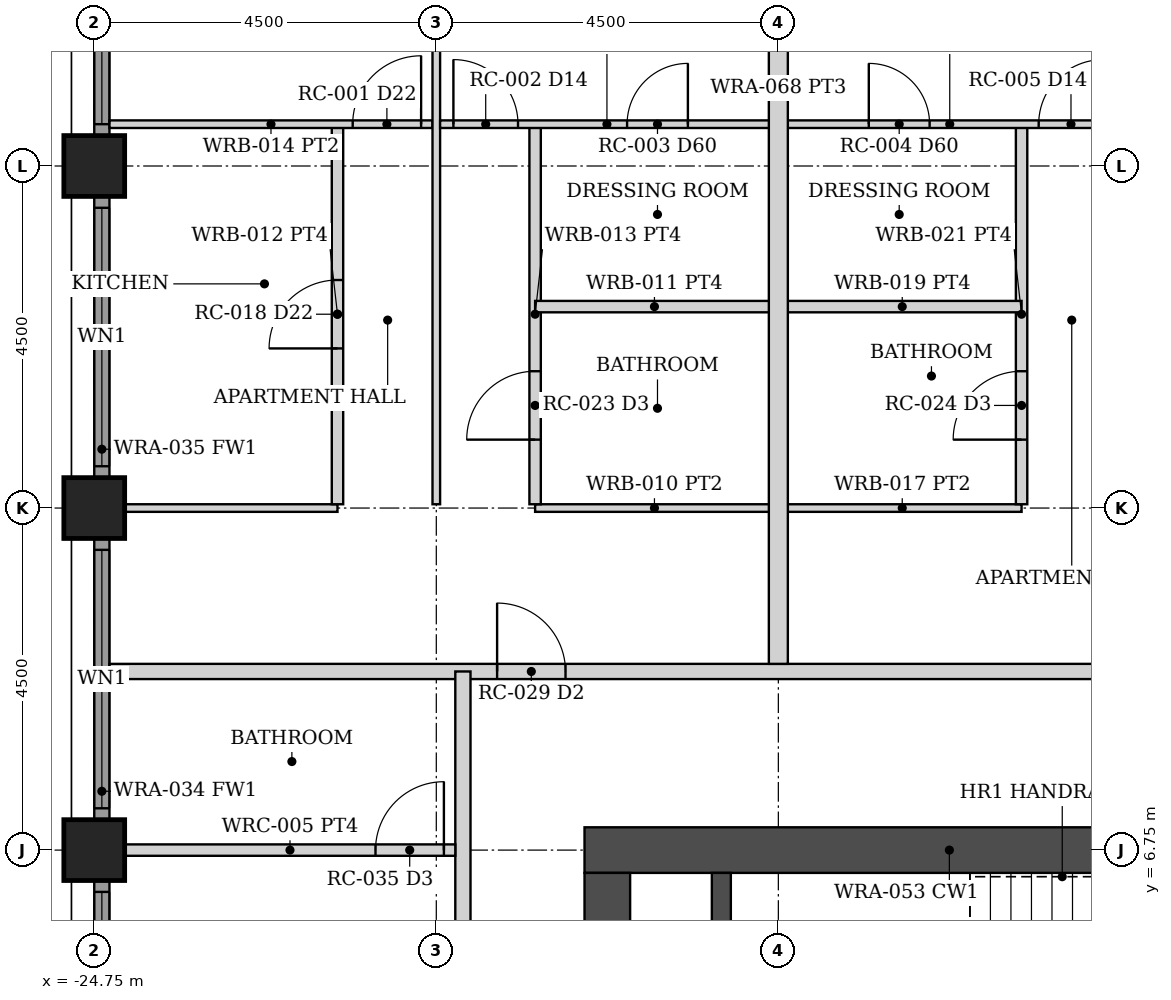
"""IFC4 building model, lengths in metres.
Left out: names, types, materials, properties, quantities, classifications, styles, units other than length and angle.
Written with IfcOpenShell. Run it as: python <this file> out.ifc"""

import sys

from ifc_helpers import new_model, si_unit, direction, frame, frame_2d, origin, origin_2d, place, context, subcontext, project, spatial, rectangle, hollow_rectangle, extrude, element, fill, save


model = new_model("IFC4")
c1 = context("Model", 3, precision=1e-05, world=origin(), true_north=direction((0.0, 1.0)))
c2 = subcontext(c1, "Body", "Model", "MODEL_VIEW")
j1 = project(units=[si_unit("LENGTHUNIT", "METRE"), si_unit("PLANEANGLEUNIT", "RADIAN")], contexts=[c1])
p1 = place(None, origin())
s1 = spatial("IfcSite", under=j1, at=p1, CompositionType="ELEMENT")
p2 = place(p1, origin())
s2 = spatial("IfcBuilding", under=s1, at=p2, CompositionType="ELEMENT")
p3 = place(p2, frame((0.0, 0.0, 47.5)))
s3 = spatial("IfcBuildingStorey", under=s2, at=p3, CompositionType="ELEMENT", Elevation=47.5)
for number, where, z_axis, x_axis in (
    (1, (-24.75, 6.75, 0.0), (0.0, 0.0, 1.0), (1.0, 0.0, 0.0)),
    (2, (-24.75, 11.25, 0.0), (0.0, 0.0, 1.0), (1.0, 0.0, 0.0)),
    (3, (-24.75, 15.75, 0.0), (0.0, 0.0, 1.0), (1.0, 0.0, 0.0)),
):
    element("IfcColumn", number, at=place(p3, frame(where, z_axis=z_axis, x_axis=x_axis)), inside=s3, PredefinedType="COLUMN", context=c2, shape_type="SweptSolid", body=[
        extrude(hollow_rectangle(XDim=0.8, YDim=0.8, WallThickness=0.07, at=origin_2d()), origin(), (0.0, 0.0, 1.0), 3.5),
    ])
p4 = place(p3, frame((-8.7, 6.75, 0.0), z_axis=(0.0, 0.0, 1.0), x_axis=(-1.0, 0.0, 0.0)))
e4 = element("IfcWall", 4, at=p4, inside=s3, PredefinedType="SHEAR", context=c2, shape_type="SweptSolid", body=[
    extrude(rectangle(XDim=9.6, YDim=0.6, at=frame_2d((4.8, 0.0))), origin(), (0.0, 0.0, 1.0), 3.5),
])
p5 = place(p3, frame((-18.0, -6.45, 0.0), z_axis=(0.0, 0.0, 1.0), x_axis=(0.0, 1.0, 0.0)))
e5 = element("IfcWall", 5, at=p5, inside=s3, PredefinedType="SHEAR", context=c2, shape_type="SweptSolid", body=[
    extrude(rectangle(XDim=12.9, YDim=0.6, at=frame_2d((6.45, 0.0))), origin(), (0.0, 0.0, 1.0), 3.5),
])
p6 = place(p3, frame((-16.5, 3.325, 0.0), z_axis=(0.0, 0.0, 1.0), x_axis=(0.0, 1.0, 0.0)))
e6 = element("IfcWall", 6, at=p6, inside=s3, PredefinedType="SHEAR", context=c2, shape_type="SweptSolid", body=[
    extrude(rectangle(XDim=3.125, YDim=0.25, at=frame_2d((1.562, 0.0))), origin(), (0.0, 0.0, 1.0), 3.5),
])
p7 = place(p3, frame((-24.65, 2.655, 0.0), z_axis=(0.0, 0.0, 1.0), x_axis=(0.0, 1.0, 0.0)))
e7 = element("IfcWall", 7, at=p7, inside=s3, PredefinedType="SOLIDWALL", context=c2, shape_type="SweptSolid", body=[
    extrude(rectangle(XDim=3.69, YDim=0.2, at=frame_2d((1.845, 0.0))), origin(), (0.0, 0.0, 1.0), 2.379),
])
p8 = place(p7, frame((0.145, 0.0, 0.3)))
e8 = element("IfcOpeningElement", 8, at=p8, cuts=e7, PredefinedType="OPENING", context=c2, shape_type="SweptSolid", body=[
    extrude(rectangle(XDim=3.4, YDim=1.929, at=frame_2d((1.7, 0.964))), frame((0.0, 0.11, 0.0), z_axis=(0.0, -1.0, 0.0), x_axis=(1.0, 0.0, 0.0)), (0.0, 0.0, 1.0), 0.22),
])
p9 = place(p3, frame((-24.65, 7.155, 0.0), z_axis=(0.0, 0.0, 1.0), x_axis=(0.0, 1.0, 0.0)))
e9 = element("IfcWall", 9, at=p9, inside=s3, PredefinedType="SOLIDWALL", context=c2, shape_type="SweptSolid", body=[
    extrude(rectangle(XDim=3.69, YDim=0.2, at=frame_2d((1.845, 0.0))), origin(), (0.0, 0.0, 1.0), 2.379),
])
p10 = place(p9, frame((0.145, 0.0, 0.3)))
e10 = element("IfcOpeningElement", 10, at=p10, cuts=e9, PredefinedType="OPENING", context=c2, shape_type="SweptSolid", body=[
    extrude(rectangle(XDim=3.4, YDim=1.929, at=frame_2d((1.7, 0.964))), frame((0.0, 0.11, 0.0), z_axis=(0.0, -1.0, 0.0), x_axis=(1.0, 0.0, 0.0)), (0.0, 0.0, 1.0), 0.22),
])
p11 = place(p3, frame((-24.65, 11.655, 0.0), z_axis=(0.0, 0.0, 1.0), x_axis=(0.0, 1.0, 0.0)))
e11 = element("IfcWall", 11, at=p11, inside=s3, PredefinedType="SOLIDWALL", context=c2, shape_type="SweptSolid", body=[
    extrude(rectangle(XDim=3.69, YDim=0.2, at=frame_2d((1.845, 0.0))), origin(), (0.0, 0.0, 1.0), 2.379),
])
p12 = place(p11, frame((0.145, 0.0, 0.3)))
e12 = element("IfcOpeningElement", 12, at=p12, cuts=e11, PredefinedType="OPENING", context=c2, shape_type="SweptSolid", body=[
    extrude(rectangle(XDim=3.4, YDim=1.929, at=frame_2d((1.7, 0.964))), frame((0.0, 0.11, 0.0), z_axis=(0.0, -1.0, 0.0), x_axis=(1.0, 0.0, 0.0)), (0.0, 0.0, 1.0), 0.22),
])
p13 = place(p3, frame((-24.65, 16.155, 0.0), z_axis=(0.0, 0.0, 1.0), x_axis=(0.0, 1.0, 0.0)))
e13 = element("IfcWall", 13, at=p13, inside=s3, PredefinedType="SOLIDWALL", context=c2, shape_type="SweptSolid", body=[
    extrude(rectangle(XDim=3.69, YDim=0.2, at=frame_2d((1.845, 0.0))), origin(), (0.0, 0.0, 1.0), 2.379),
])
p14 = place(p13, frame((0.145, 0.0, 0.3)))
e14 = element("IfcOpeningElement", 14, at=p14, cuts=e13, PredefinedType="OPENING", context=c2, shape_type="SweptSolid", body=[
    extrude(rectangle(XDim=3.4, YDim=1.929, at=frame_2d((1.7, 0.964))), frame((0.0, 0.11, 0.0), z_axis=(0.0, -1.0, 0.0), x_axis=(1.0, 0.0, 0.0)), (0.0, 0.0, 1.0), 0.22),
])
p15 = place(p3, frame((-24.55, 9.1, 0.0), z_axis=(0.0, 0.0, 1.0), x_axis=(1.0, 0.0, 0.0)))
e15 = element("IfcWall", 15, at=p15, inside=s3, PredefinedType="PARTITIONING", context=c2, shape_type="SweptSolid", body=[
    extrude(rectangle(XDim=49.1, YDim=0.2, at=frame_2d((24.55, 0.0))), origin(), (0.0, 0.0, 1.0), 2.373),
])
p16 = place(p15, frame((5.1, 0.0, 0.0)))
e16 = element("IfcOpeningElement", 16, at=p16, cuts=e15, PredefinedType="OPENING", context=c2, shape_type="SweptSolid", body=[
    extrude(rectangle(XDim=0.9, YDim=2.1, at=frame_2d((0.45, 1.05))), frame((0.0, 0.11, 0.0), z_axis=(0.0, -1.0, 0.0), x_axis=(1.0, 0.0, 0.0)), (0.0, 0.0, 1.0), 0.22),
])
p17 = place(p15, frame((13.6, 0.0, 0.0)))
e17 = element("IfcOpeningElement", 17, at=p17, cuts=e15, PredefinedType="OPENING", context=c2, shape_type="SweptSolid", body=[
    extrude(rectangle(XDim=0.9, YDim=2.1, at=frame_2d((0.45, 1.05))), frame((0.0, 0.11, 0.0), z_axis=(0.0, -1.0, 0.0), x_axis=(1.0, 0.0, 0.0)), (0.0, 0.0, 1.0), 0.22),
])
p18 = place(p15, frame((18.1, 0.0, 0.0)))
e18 = element("IfcOpeningElement", 18, at=p18, cuts=e15, PredefinedType="OPENING", context=c2, shape_type="SweptSolid", body=[
    extrude(rectangle(XDim=0.9, YDim=2.1, at=frame_2d((0.45, 1.05))), frame((0.0, 0.11, 0.0), z_axis=(0.0, -1.0, 0.0), x_axis=(1.0, 0.0, 0.0)), (0.0, 0.0, 1.0), 0.22),
])
p19 = place(p15, frame((31.6, 0.0, 0.0)))
e19 = element("IfcOpeningElement", 19, at=p19, cuts=e15, PredefinedType="OPENING", context=c2, shape_type="SweptSolid", body=[
    extrude(rectangle(XDim=0.9, YDim=2.1, at=frame_2d((0.45, 1.05))), frame((0.0, 0.11, 0.0), z_axis=(0.0, -1.0, 0.0), x_axis=(1.0, 0.0, 0.0)), (0.0, 0.0, 1.0), 0.22),
])
p20 = place(p15, frame((43.1, 0.0, 0.0)))
e20 = element("IfcOpeningElement", 20, at=p20, cuts=e15, PredefinedType="OPENING", context=c2, shape_type="SweptSolid", body=[
    extrude(rectangle(XDim=0.9, YDim=2.1, at=frame_2d((0.45, 1.05))), frame((0.0, 0.11, 0.0), z_axis=(0.0, -1.0, 0.0), x_axis=(1.0, 0.0, 0.0)), (0.0, 0.0, 1.0), 0.22),
])
p21 = place(p3, frame((-19.9, -9.1, 0.0), z_axis=(0.0, 0.0, 1.0), x_axis=(0.0, 1.0, 0.0)))
e21 = element("IfcWall", 21, at=p21, inside=s3, PredefinedType="PARTITIONING", context=c2, shape_type="SweptSolid", body=[
    extrude(rectangle(XDim=18.2, YDim=0.2, at=frame_2d((9.1, 0.0))), origin(), (0.0, 0.0, 1.0), 2.373),
])
p22 = place(p21, frame((6.4, 0.0, 0.0)))
e22 = element("IfcOpeningElement", 22, at=p22, cuts=e21, PredefinedType="OPENING", context=c2, shape_type="SweptSolid", body=[
    extrude(rectangle(XDim=0.9, YDim=2.1, at=frame_2d((0.45, 1.05))), frame((0.0, 0.11, 0.0), z_axis=(0.0, -1.0, 0.0), x_axis=(1.0, 0.0, 0.0)), (0.0, 0.0, 1.0), 0.22),
])
p23 = place(p3, frame((-24.35, 11.25, 0.0), z_axis=(0.0, 0.0, 1.0), x_axis=(1.0, 0.0, 0.0)))
e23 = element("IfcWall", 23, at=p23, inside=s3, PredefinedType="PARTITIONING", context=c2, shape_type="SweptSolid", body=[
    extrude(rectangle(XDim=2.8, YDim=0.1, at=frame_2d((1.4, 0.0))), origin(), (0.0, 0.0, 1.0), 2.373),
])
p24 = place(p3, frame((-21.55, 11.3, 0.0), z_axis=(0.0, 0.0, 1.0), x_axis=(0.0, 1.0, 0.0)))
e24 = element("IfcWall", 24, at=p24, inside=s3, PredefinedType="PARTITIONING", context=c2, shape_type="SweptSolid", body=[
    extrude(rectangle(XDim=5.0, YDim=0.15, at=frame_2d((2.5, 0.0))), origin(), (0.0, 0.0, 1.0), 2.373),
])
p25 = place(p24, frame((2.05, 0.0, 0.0)))
e25 = element("IfcOpeningElement", 25, at=p25, cuts=e24, PredefinedType="OPENING", context=c2, shape_type="SweptSolid", body=[
    extrude(rectangle(XDim=0.9, YDim=2.1, at=frame_2d((0.45, 1.05))), frame((0.0, 0.085, 0.0), z_axis=(0.0, -1.0, 0.0), x_axis=(1.0, 0.0, 0.0)), (0.0, 0.0, 1.0), 0.17),
])
p26 = place(p3, frame((-24.55, 16.3, 0.0), z_axis=(0.0, 0.0, 1.0), x_axis=(1.0, 0.0, 0.0)))
e26 = element("IfcWall", 26, at=p26, inside=s3, PredefinedType="PARTITIONING", context=c2, shape_type="SweptSolid", body=[
    extrude(rectangle(XDim=4.25, YDim=0.1, at=frame_2d((2.125, 0.0))), origin(), (0.0, 0.0, 1.0), 2.373),
])
p27 = place(p26, frame((3.2, 0.0, 0.0)))
e27 = element("IfcOpeningElement", 27, at=p27, cuts=e26, PredefinedType="OPENING", context=c2, shape_type="SweptSolid", body=[
    extrude(rectangle(XDim=0.9, YDim=2.1, at=frame_2d((0.45, 1.05))), frame((0.0, 0.06, 0.0), z_axis=(0.0, -1.0, 0.0), x_axis=(1.0, 0.0, 0.0)), (0.0, 0.0, 1.0), 0.12),
])
p28 = place(p3, frame((-20.25, 11.3, 0.0), z_axis=(0.0, 0.0, 1.0), x_axis=(0.0, 1.0, 0.0)))
e28 = element("IfcWall", 28, at=p28, inside=s3, PredefinedType="PARTITIONING", context=c2, shape_type="SweptSolid", body=[
    extrude(rectangle(XDim=13.05, YDim=0.1, at=frame_2d((6.525, 0.0))), origin(), (0.0, 0.0, 1.0), 2.373),
])
p29 = place(p3, frame((-18.95, 11.25, 0.0), z_axis=(0.0, 0.0, 1.0), x_axis=(1.0, 0.0, 0.0)))
e29 = element("IfcWall", 29, at=p29, inside=s3, PredefinedType="PARTITIONING", context=c2, shape_type="SweptSolid", body=[
    extrude(rectangle(XDim=3.14, YDim=0.1, at=frame_2d((1.57, 0.0))), origin(), (0.0, 0.0, 1.0), 2.373),
])
p30 = place(p3, frame((-18.95, 11.3, 0.0), z_axis=(0.0, 0.0, 1.0), x_axis=(0.0, 1.0, 0.0)))
e30 = element("IfcWall", 30, at=p30, inside=s3, PredefinedType="PARTITIONING", context=c2, shape_type="SweptSolid", body=[
    extrude(rectangle(XDim=5.0, YDim=0.15, at=frame_2d((2.5, 0.0))), origin(), (0.0, 0.0, 1.0), 2.373),
])
p31 = place(p30, frame((0.85, 0.0, 0.0)))
e31 = element("IfcOpeningElement", 31, at=p31, cuts=e30, PredefinedType="OPENING", context=c2, shape_type="SweptSolid", body=[
    extrude(rectangle(XDim=0.9, YDim=2.1, at=frame_2d((0.45, 1.05))), frame((0.0, 0.085, 0.0), z_axis=(0.0, -1.0, 0.0), x_axis=(1.0, 0.0, 0.0)), (0.0, 0.0, 1.0), 0.17),
])
p32 = place(p3, frame((-20.2, 16.3, 0.0), z_axis=(0.0, 0.0, 1.0), x_axis=(1.0, 0.0, 0.0)))
e32 = element("IfcWall", 32, at=p32, inside=s3, PredefinedType="PARTITIONING", context=c2, shape_type="SweptSolid", body=[
    extrude(rectangle(XDim=4.39, YDim=0.1, at=frame_2d((2.195, 0.0))), origin(), (0.0, 0.0, 1.0), 2.373),
])
p33 = place(p32, frame((0.175, 0.0, 0.0)))
e33 = element("IfcOpeningElement", 33, at=p33, cuts=e32, PredefinedType="OPENING", context=c2, shape_type="SweptSolid", body=[
    extrude(rectangle(XDim=0.85, YDim=2.1, at=frame_2d((0.425, 1.05))), frame((0.0, 0.06, 0.0), z_axis=(0.0, -1.0, 0.0), x_axis=(1.0, 0.0, 0.0)), (0.0, 0.0, 1.0), 0.12),
])
p34 = place(p32, frame((2.46, 0.0, 0.0)))
e34 = element("IfcOpeningElement", 34, at=p34, cuts=e32, PredefinedType="OPENING", context=c2, shape_type="SweptSolid", body=[
    extrude(rectangle(XDim=0.8, YDim=2.1, at=frame_2d((0.4, 1.05))), frame((0.0, 0.06, 0.0), z_axis=(0.0, -1.0, 0.0), x_axis=(1.0, 0.0, 0.0)), (0.0, 0.0, 1.0), 0.12),
])
p35 = place(p3, frame((-18.95, 13.9, 0.0), z_axis=(0.0, 0.0, 1.0), x_axis=(1.0, 0.0, 0.0)))
e35 = element("IfcWall", 35, at=p35, inside=s3, PredefinedType="PARTITIONING", context=c2, shape_type="SweptSolid", body=[
    extrude(rectangle(XDim=3.14, YDim=0.15, at=frame_2d((1.57, 0.0))), origin(), (0.0, 0.0, 1.0), 2.373),
])
p36 = place(p3, frame((-15.69, 11.25, 0.0), z_axis=(0.0, 0.0, 1.0), x_axis=(1.0, 0.0, 0.0)))
e36 = element("IfcWall", 36, at=p36, inside=s3, PredefinedType="PARTITIONING", context=c2, shape_type="SweptSolid", body=[
    extrude(rectangle(XDim=3.14, YDim=0.1, at=frame_2d((1.57, 0.0))), origin(), (0.0, 0.0, 1.0), 2.373),
])
p37 = place(p3, frame((-12.55, 11.3, 0.0), z_axis=(0.0, 0.0, 1.0), x_axis=(0.0, 1.0, 0.0)))
e37 = element("IfcWall", 37, at=p37, inside=s3, PredefinedType="PARTITIONING", context=c2, shape_type="SweptSolid", body=[
    extrude(rectangle(XDim=5.0, YDim=0.15, at=frame_2d((2.5, 0.0))), origin(), (0.0, 0.0, 1.0), 2.373),
])
p38 = place(p37, frame((0.85, 0.0, 0.0)))
e38 = element("IfcOpeningElement", 38, at=p38, cuts=e37, PredefinedType="OPENING", context=c2, shape_type="SweptSolid", body=[
    extrude(rectangle(XDim=0.9, YDim=2.1, at=frame_2d((0.45, 1.05))), frame((0.0, 0.085, 0.0), z_axis=(0.0, -1.0, 0.0), x_axis=(1.0, 0.0, 0.0)), (0.0, 0.0, 1.0), 0.17),
])
p39 = place(p3, frame((-15.69, 16.3, 0.0), z_axis=(0.0, 0.0, 1.0), x_axis=(1.0, 0.0, 0.0)))
e39 = element("IfcWall", 39, at=p39, inside=s3, PredefinedType="PARTITIONING", context=c2, shape_type="SweptSolid", body=[
    extrude(rectangle(XDim=4.39, YDim=0.1, at=frame_2d((2.195, 0.0))), origin(), (0.0, 0.0, 1.0), 2.373),
])
p40 = place(p39, frame((3.365, 0.0, 0.0)))
e40 = element("IfcOpeningElement", 40, at=p40, cuts=e39, PredefinedType="OPENING", context=c2, shape_type="SweptSolid", body=[
    extrude(rectangle(XDim=0.85, YDim=2.1, at=frame_2d((0.425, 1.05))), frame((0.0, 0.06, 0.0), z_axis=(0.0, -1.0, 0.0), x_axis=(1.0, 0.0, 0.0)), (0.0, 0.0, 1.0), 0.12),
])
p41 = place(p39, frame((1.13, 0.0, 0.0)))
e41 = element("IfcOpeningElement", 41, at=p41, cuts=e39, PredefinedType="OPENING", context=c2, shape_type="SweptSolid", body=[
    extrude(rectangle(XDim=0.8, YDim=2.1, at=frame_2d((0.4, 1.05))), frame((0.0, 0.06, 0.0), z_axis=(0.0, -1.0, 0.0), x_axis=(1.0, 0.0, 0.0)), (0.0, 0.0, 1.0), 0.12),
])
p42 = place(p3, frame((-15.69, 13.9, 0.0), z_axis=(0.0, 0.0, 1.0), x_axis=(1.0, 0.0, 0.0)))
e42 = element("IfcWall", 42, at=p42, inside=s3, PredefinedType="PARTITIONING", context=c2, shape_type="SweptSolid", body=[
    extrude(rectangle(XDim=3.14, YDim=0.15, at=frame_2d((1.57, 0.0))), origin(), (0.0, 0.0, 1.0), 2.373),
])
p43 = place(p3, frame((-15.75, 9.2, 0.0), z_axis=(0.0, 0.0, 1.0), x_axis=(0.0, 1.0, 0.0)))
e43 = element("IfcWall", 43, at=p43, inside=s3, PredefinedType="PARTITIONING", context=c2, shape_type="SweptSolid", body=[
    extrude(rectangle(XDim=15.15, YDim=0.25, at=frame_2d((7.575, 0.0))), origin(), (0.0, 0.0, 1.0), 2.373),
])
p44 = place(p3, frame((-24.35, 6.75, 0.0), z_axis=(0.0, 0.0, 1.0), x_axis=(1.0, 0.0, 0.0)))
e44 = element("IfcWall", 44, at=p44, inside=s3, PredefinedType="PARTITIONING", context=c2, shape_type="SweptSolid", body=[
    extrude(rectangle(XDim=4.35, YDim=0.15, at=frame_2d((2.175, 0.0))), origin(), (0.0, 0.0, 1.0), 2.373),
])
p45 = place(p44, frame((3.3, 0.0, 0.0)))
e45 = element("IfcOpeningElement", 45, at=p45, cuts=e44, PredefinedType="OPENING", context=c2, shape_type="SweptSolid", body=[
    extrude(rectangle(XDim=0.9, YDim=2.1, at=frame_2d((0.45, 1.05))), frame((0.0, 0.085, 0.0), z_axis=(0.0, -1.0, 0.0), x_axis=(1.0, 0.0, 0.0)), (0.0, 0.0, 1.0), 0.17),
])
p46 = place(p8, origin())
e46 = element("IfcWindow", 46, at=p46, inside=s3, PartitioningType="SINGLE_PANEL", PredefinedType="WINDOW", context=c2, shape_type="SweptSolid", body=[
    extrude(rectangle(XDim=3.4, YDim=1.929, at=frame_2d((1.7, 0.964))), frame((0.0, 0.03, 0.0), z_axis=(0.0, -1.0, 0.0), x_axis=(1.0, 0.0, 0.0)), (0.0, 0.0, 1.0), 0.06),
])
fill(e8, e46)
p47 = place(p10, origin())
e47 = element("IfcWindow", 47, at=p47, inside=s3, PartitioningType="SINGLE_PANEL", PredefinedType="WINDOW", context=c2, shape_type="SweptSolid", body=[
    extrude(rectangle(XDim=3.4, YDim=1.929, at=frame_2d((1.7, 0.964))), frame((0.0, 0.03, 0.0), z_axis=(0.0, -1.0, 0.0), x_axis=(1.0, 0.0, 0.0)), (0.0, 0.0, 1.0), 0.06),
])
fill(e10, e47)
p48 = place(p12, origin())
e48 = element("IfcWindow", 48, at=p48, inside=s3, PartitioningType="SINGLE_PANEL", PredefinedType="WINDOW", context=c2, shape_type="SweptSolid", body=[
    extrude(rectangle(XDim=3.4, YDim=1.929, at=frame_2d((1.7, 0.964))), frame((0.0, 0.03, 0.0), z_axis=(0.0, -1.0, 0.0), x_axis=(1.0, 0.0, 0.0)), (0.0, 0.0, 1.0), 0.06),
])
fill(e12, e48)
p49 = place(p14, origin())
e49 = element("IfcWindow", 49, at=p49, inside=s3, PartitioningType="SINGLE_PANEL", PredefinedType="WINDOW", context=c2, shape_type="SweptSolid", body=[
    extrude(rectangle(XDim=3.4, YDim=1.929, at=frame_2d((1.7, 0.964))), frame((0.0, 0.03, 0.0), z_axis=(0.0, -1.0, 0.0), x_axis=(1.0, 0.0, 0.0)), (0.0, 0.0, 1.0), 0.06),
])
fill(e14, e49)
p50 = place(p16, origin())
e50 = element("IfcDoor", 50, at=p50, inside=s3, OperationType="SINGLE_SWING_LEFT", PredefinedType="DOOR", context=c2, shape_type="SweptSolid", body=[
    extrude(rectangle(XDim=0.9, YDim=2.1, at=frame_2d((0.45, 1.05))), frame((0.0, 0.025, 0.0), z_axis=(0.0, -1.0, 0.0), x_axis=(1.0, 0.0, 0.0)), (0.0, 0.0, 1.0), 0.05),
])
fill(e16, e50)
p51 = place(p25, origin())
e51 = element("IfcDoor", 51, at=p51, inside=s3, OperationType="SINGLE_SWING_LEFT", PredefinedType="DOOR", context=c2, shape_type="SweptSolid", body=[
    extrude(rectangle(XDim=0.9, YDim=2.1, at=frame_2d((0.45, 1.05))), frame((0.0, 0.025, 0.0), z_axis=(0.0, -1.0, 0.0), x_axis=(1.0, 0.0, 0.0)), (0.0, 0.0, 1.0), 0.05),
])
fill(e25, e51)
p52 = place(p27, origin())
e52 = element("IfcDoor", 52, at=p52, inside=s3, OperationType="SINGLE_SWING_RIGHT", PredefinedType="DOOR", context=c2, shape_type="SweptSolid", body=[
    extrude(rectangle(XDim=0.9, YDim=2.1, at=frame_2d((0.45, 1.05))), frame((0.0, 0.025, 0.0), z_axis=(0.0, -1.0, 0.0), x_axis=(1.0, 0.0, 0.0)), (0.0, 0.0, 1.0), 0.05),
])
fill(e27, e52)
p53 = place(p33, origin())
e53 = element("IfcDoor", 53, at=p53, inside=s3, OperationType="SINGLE_SWING_LEFT", PredefinedType="DOOR", context=c2, shape_type="SweptSolid", body=[
    extrude(rectangle(XDim=0.85, YDim=2.1, at=frame_2d((0.425, 1.05))), frame((0.0, 0.025, 0.0), z_axis=(0.0, -1.0, 0.0), x_axis=(1.0, 0.0, 0.0)), (0.0, 0.0, 1.0), 0.05),
])
fill(e33, e53)
p54 = place(p31, origin())
e54 = element("IfcDoor", 54, at=p54, inside=s3, OperationType="SINGLE_SWING_LEFT", PredefinedType="DOOR", context=c2, shape_type="SweptSolid", body=[
    extrude(rectangle(XDim=0.9, YDim=2.1, at=frame_2d((0.45, 1.05))), frame((0.0, 0.025, 0.0), z_axis=(0.0, -1.0, 0.0), x_axis=(1.0, 0.0, 0.0)), (0.0, 0.0, 1.0), 0.05),
])
fill(e31, e54)
p55 = place(p34, origin())
e55 = element("IfcDoor", 55, at=p55, inside=s3, OperationType="SINGLE_SWING_RIGHT", PredefinedType="DOOR", context=c2, shape_type="SweptSolid", body=[
    extrude(rectangle(XDim=0.8, YDim=2.1, at=frame_2d((0.4, 1.05))), frame((0.0, 0.025, 0.0), z_axis=(0.0, -1.0, 0.0), x_axis=(1.0, 0.0, 0.0)), (0.0, 0.0, 1.0), 0.05),
])
fill(e34, e55)
p56 = place(p40, origin())
e56 = element("IfcDoor", 56, at=p56, inside=s3, OperationType="SINGLE_SWING_RIGHT", PredefinedType="DOOR", context=c2, shape_type="SweptSolid", body=[
    extrude(rectangle(XDim=0.85, YDim=2.1, at=frame_2d((0.425, 1.05))), frame((0.0, 0.025, 0.0), z_axis=(0.0, -1.0, 0.0), x_axis=(1.0, 0.0, 0.0)), (0.0, 0.0, 1.0), 0.05),
])
fill(e40, e56)
p57 = place(p38, origin())
e57 = element("IfcDoor", 57, at=p57, inside=s3, OperationType="SINGLE_SWING_LEFT", PredefinedType="DOOR", context=c2, shape_type="SweptSolid", body=[
    extrude(rectangle(XDim=0.9, YDim=2.1, at=frame_2d((0.45, 1.05))), frame((0.0, 0.025, 0.0), z_axis=(0.0, -1.0, 0.0), x_axis=(1.0, 0.0, 0.0)), (0.0, 0.0, 1.0), 0.05),
])
fill(e38, e57)
p58 = place(p41, origin())
e58 = element("IfcDoor", 58, at=p58, inside=s3, OperationType="SINGLE_SWING_LEFT", PredefinedType="DOOR", context=c2, shape_type="SweptSolid", body=[
    extrude(rectangle(XDim=0.8, YDim=2.1, at=frame_2d((0.4, 1.05))), frame((0.0, 0.025, 0.0), z_axis=(0.0, -1.0, 0.0), x_axis=(1.0, 0.0, 0.0)), (0.0, 0.0, 1.0), 0.05),
])
fill(e41, e58)
p59 = place(p45, origin())
e59 = element("IfcDoor", 59, at=p59, inside=s3, OperationType="SINGLE_SWING_RIGHT", PredefinedType="DOOR", context=c2, shape_type="SweptSolid", body=[
    extrude(rectangle(XDim=0.9, YDim=2.1, at=frame_2d((0.45, 1.05))), frame((0.0, 0.025, 0.0), z_axis=(0.0, -1.0, 0.0), x_axis=(1.0, 0.0, 0.0)), (0.0, 0.0, 1.0), 0.05),
])
fill(e45, e59)
save(model, sys.argv[1])
